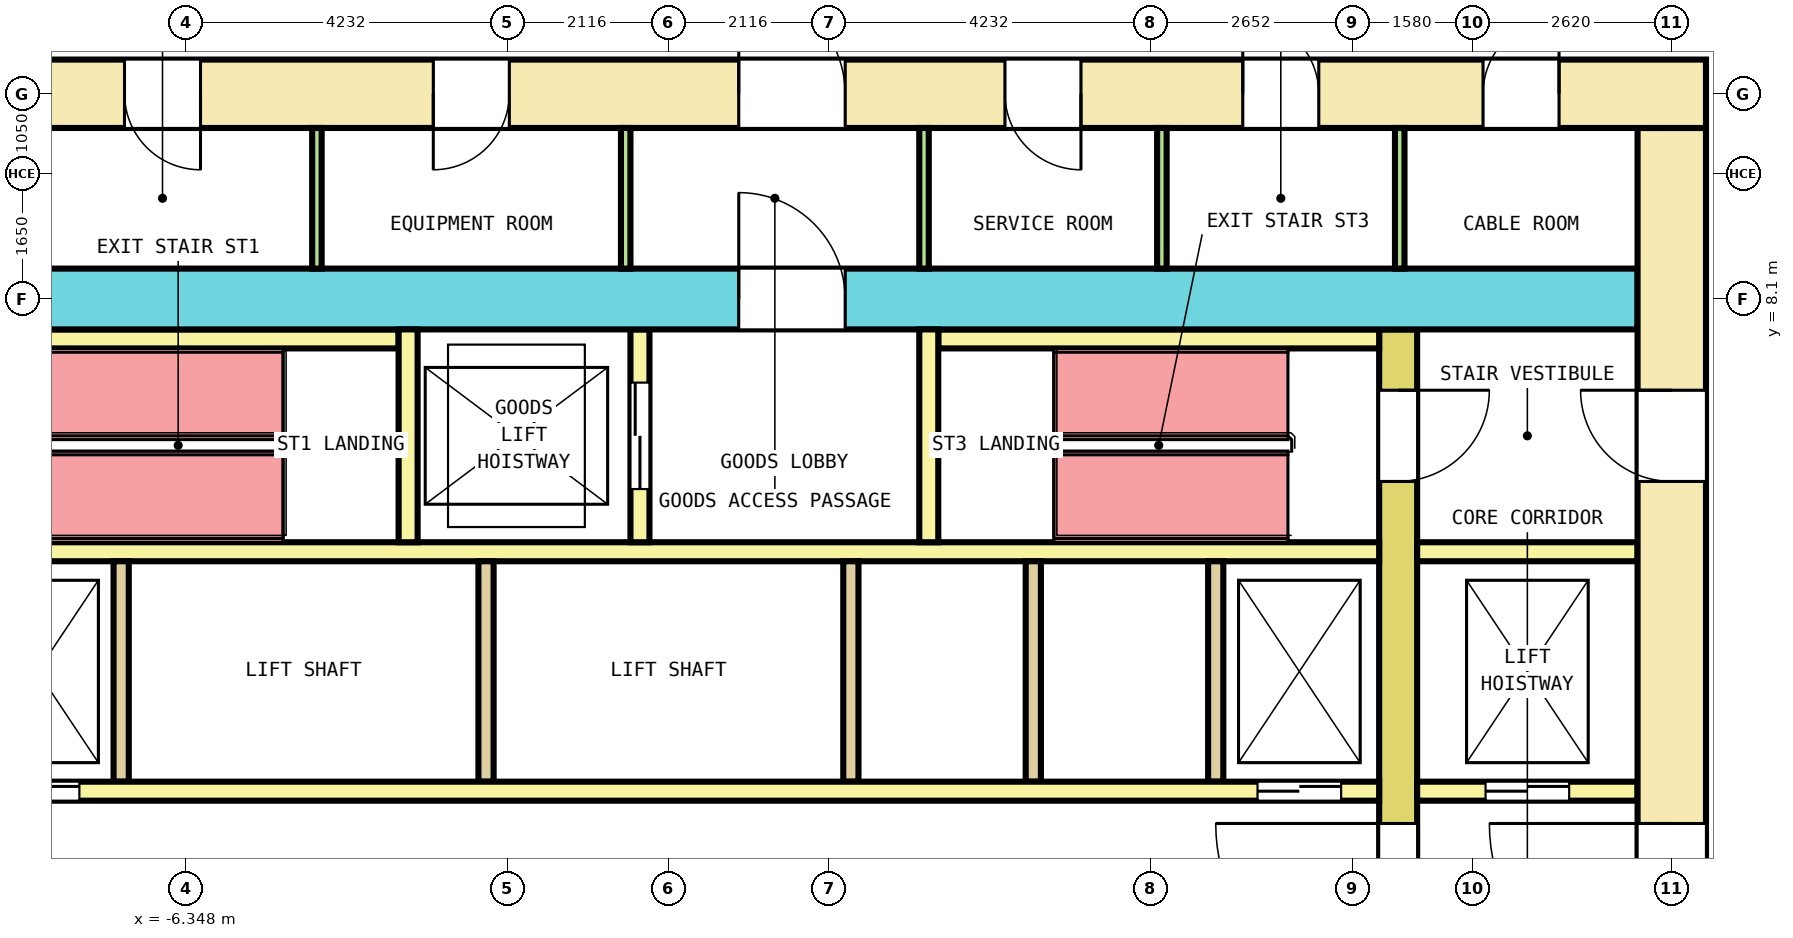
"""IFC4 building model, lengths in metres.
Left out: names, types, materials, properties, quantities, classifications, styles, units other than length and angle.
Written with IfcOpenShell. Run it as: python <this file> out.ifc"""

import sys

from ifc_helpers import new_model, si_unit, direction, frame, frame_2d, origin, place, context, subcontext, project, spatial, rectangle, extrude, element, fill, save


model = new_model("IFC4")
c1 = context("Model", 3, precision=1e-05, world=origin(), true_north=direction((0.0, 1.0)))
c2 = subcontext(c1, "Body", "Model", "MODEL_VIEW")
j1 = project(units=[si_unit("LENGTHUNIT", "METRE"), si_unit("PLANEANGLEUNIT", "RADIAN")], contexts=[c1])
p1 = place(None, origin())
s1 = spatial("IfcSite", under=j1, at=p1, CompositionType="ELEMENT")
p2 = place(p1, origin())
s2 = spatial("IfcBuilding", under=s1, at=p2, CompositionType="ELEMENT")
p3 = place(p2, frame((0.0, 0.0, 54.2)))
s3 = spatial("IfcBuildingStorey", under=s2, at=p3, CompositionType="ELEMENT", Elevation=54.2)
p4 = place(p3, frame((-13.65, 10.8, 0.0), z_axis=(0.0, 0.0, 1.0), x_axis=(1.0, 0.0, 0.0)))
e1 = element("IfcWall", 1, at=p4, inside=s3, PredefinedType="SHEAR", context=c2, shape_type="SweptSolid", body=[
    extrude(rectangle(XDim=27.3, YDim=0.9, at=frame_2d((13.65, 0.0))), origin(), (0.0, 0.0, 1.0), 4.1),
])
p5 = place(p4, frame((2.4, 0.0, 0.0)))
e2 = element("IfcOpeningElement", 2, at=p5, cuts=e1, PredefinedType="OPENING", context=c2, shape_type="SweptSolid", body=[
    extrude(rectangle(XDim=1.0, YDim=2.1, at=frame_2d((0.5, 1.05))), frame((0.0, 0.46, 0.0), z_axis=(0.0, -1.0, 0.0), x_axis=(1.0, 0.0, 0.0)), (0.0, 0.0, 1.0), 0.92),
])
p6 = place(p4, frame((6.494, 0.0, 0.0)))
e3 = element("IfcOpeningElement", 3, at=p6, cuts=e1, PredefinedType="OPENING", context=c2, shape_type="SweptSolid", body=[
    extrude(rectangle(XDim=1.0, YDim=2.1, at=frame_2d((0.5, 1.05))), frame((0.0, 0.46, 0.0), z_axis=(0.0, -1.0, 0.0), x_axis=(1.0, 0.0, 0.0)), (0.0, 0.0, 1.0), 0.92),
])
p7 = place(p4, frame((10.556, 0.0, 0.0)))
e4 = element("IfcOpeningElement", 4, at=p7, cuts=e1, PredefinedType="OPENING", context=c2, shape_type="SweptSolid", body=[
    extrude(rectangle(XDim=1.0, YDim=2.1, at=frame_2d((0.5, 1.05))), frame((0.0, 0.46, 0.0), z_axis=(0.0, -1.0, 0.0), x_axis=(1.0, 0.0, 0.0)), (0.0, 0.0, 1.0), 0.92),
])
p8 = place(p4, frame((18.077, 0.0, 0.0)))
e5 = element("IfcOpeningElement", 5, at=p8, cuts=e1, PredefinedType="OPENING", context=c2, shape_type="SweptSolid", body=[
    extrude(rectangle(XDim=1.0, YDim=2.1, at=frame_2d((0.5, 1.05))), frame((0.0, 0.46, 0.0), z_axis=(0.0, -1.0, 0.0), x_axis=(1.0, 0.0, 0.0)), (0.0, 0.0, 1.0), 0.92),
])
p9 = place(p4, frame((21.206, 0.0, 0.0)))
e6 = element("IfcOpeningElement", 6, at=p9, cuts=e1, PredefinedType="OPENING", context=c2, shape_type="SweptSolid", body=[
    extrude(rectangle(XDim=1.0, YDim=2.1, at=frame_2d((0.5, 1.05))), frame((0.0, 0.46, 0.0), z_axis=(0.0, -1.0, 0.0), x_axis=(1.0, 0.0, 0.0)), (0.0, 0.0, 1.0), 0.92),
])
p10 = place(p4, frame((24.367, 0.0, 0.0)))
e7 = element("IfcOpeningElement", 7, at=p10, cuts=e1, PredefinedType="OPENING", context=c2, shape_type="SweptSolid", body=[
    extrude(rectangle(XDim=1.0, YDim=2.1, at=frame_2d((0.5, 1.05))), frame((0.0, 0.46, 0.0), z_axis=(0.0, -1.0, 0.0), x_axis=(1.0, 0.0, 0.0)), (0.0, 0.0, 1.0), 0.92),
])
p11 = place(p4, frame((14.575, 0.0, 0.0)))
e8 = element("IfcOpeningElement", 8, at=p11, cuts=e1, PredefinedType="OPENING", context=c2, shape_type="SweptSolid", body=[
    extrude(rectangle(XDim=1.4, YDim=2.1, at=frame_2d((0.7, 1.05))), frame((0.0, 0.46, 0.0), z_axis=(0.0, -1.0, 0.0), x_axis=(1.0, 0.0, 0.0)), (0.0, 0.0, 1.0), 0.92),
])
p12 = place(p3, frame((13.2, -10.35, 0.0), z_axis=(0.0, 0.0, 1.0), x_axis=(0.0, 1.0, 0.0)))
e9 = element("IfcWall", 9, at=p12, inside=s3, PredefinedType="SHEAR", context=c2, shape_type="SweptSolid", body=[
    extrude(rectangle(XDim=20.7, YDim=0.9, at=frame_2d((10.35, 0.0))), origin(), (0.0, 0.0, 1.0), 4.1),
])
p13 = place(p12, frame((9.15, 0.0, 0.0)))
e10 = element("IfcOpeningElement", 10, at=p13, cuts=e9, PredefinedType="OPENING", context=c2, shape_type="SweptSolid", body=[
    extrude(rectangle(XDim=2.4, YDim=2.1, at=frame_2d((1.2, 1.05))), frame((0.0, 0.46, 0.0), z_axis=(0.0, -1.0, 0.0), x_axis=(1.0, 0.0, 0.0)), (0.0, 0.0, 1.0), 0.92),
])
p14 = place(p12, frame((16.05, 0.0, 0.0)))
e11 = element("IfcOpeningElement", 11, at=p14, cuts=e9, PredefinedType="OPENING", context=c2, shape_type="SweptSolid", body=[
    extrude(rectangle(XDim=1.2, YDim=2.1, at=frame_2d((0.6, 1.05))), frame((0.0, 0.46, 0.0), z_axis=(0.0, -1.0, 0.0), x_axis=(1.0, 0.0, 0.0)), (0.0, 0.0, 1.0), 0.92),
])
p15 = place(p12, frame((2.819, 0.0, 0.0)))
e12 = element("IfcOpeningElement", 12, at=p15, cuts=e9, PredefinedType="OPENING", context=c2, shape_type="SweptSolid", body=[
    extrude(rectangle(XDim=1.0, YDim=2.1, at=frame_2d((0.5, 1.05))), frame((0.0, 0.46, 0.0), z_axis=(0.0, -1.0, 0.0), x_axis=(1.0, 0.0, 0.0)), (0.0, 0.0, 1.0), 0.92),
])
p16 = place(p12, frame((4.281, 0.0, 0.0)))
e13 = element("IfcOpeningElement", 13, at=p16, cuts=e9, PredefinedType="OPENING", context=c2, shape_type="SweptSolid", body=[
    extrude(rectangle(XDim=1.0, YDim=2.1, at=frame_2d((0.5, 1.05))), frame((0.0, 0.46, 0.0), z_axis=(0.0, -1.0, 0.0), x_axis=(1.0, 0.0, 0.0)), (0.0, 0.0, 1.0), 0.92),
])
p17 = place(p3, frame((-12.75, 8.1, 0.0), z_axis=(0.0, 0.0, 1.0), x_axis=(1.0, 0.0, 0.0)))
e14 = element("IfcWall", 14, at=p17, inside=s3, PredefinedType="SHEAR", context=c2, shape_type="SweptSolid", body=[
    extrude(rectangle(XDim=25.5, YDim=0.8, at=frame_2d((12.75, 0.0))), origin(), (0.0, 0.0, 1.0), 4.1),
])
p18 = place(p17, frame((13.675, 0.0, 0.0)))
e15 = element("IfcOpeningElement", 15, at=p18, cuts=e14, PredefinedType="OPENING", context=c2, shape_type="SweptSolid", body=[
    extrude(rectangle(XDim=1.4, YDim=2.1, at=frame_2d((0.7, 1.05))), frame((0.0, 0.41, 0.0), z_axis=(0.0, -1.0, 0.0), x_axis=(1.0, 0.0, 0.0)), (0.0, 0.0, 1.0), 0.82),
])
p19 = place(p3, frame((9.6, -7.7, 0.0), z_axis=(0.0, 0.0, 1.0), x_axis=(0.0, 1.0, 0.0)))
e16 = element("IfcWall", 16, at=p19, inside=s3, PredefinedType="SHEAR", context=c2, shape_type="SweptSolid", body=[
    extrude(rectangle(XDim=15.4, YDim=0.5, at=frame_2d((7.7, 0.0))), origin(), (0.0, 0.0, 1.0), 4.1),
])
p20 = place(p19, frame((6.5, 0.0, 0.0)))
e17 = element("IfcOpeningElement", 17, at=p20, cuts=e16, PredefinedType="OPENING", context=c2, shape_type="SweptSolid", body=[
    extrude(rectangle(XDim=2.4, YDim=2.1, at=frame_2d((1.2, 1.05))), frame((0.0, 0.26, 0.0), z_axis=(0.0, -1.0, 0.0), x_axis=(1.0, 0.0, 0.0)), (0.0, 0.0, 1.0), 0.52),
])
p21 = place(p19, frame((13.4, 0.0, 0.0)))
e18 = element("IfcOpeningElement", 18, at=p21, cuts=e16, PredefinedType="OPENING", context=c2, shape_type="SweptSolid", body=[
    extrude(rectangle(XDim=1.2, YDim=2.1, at=frame_2d((0.6, 1.05))), frame((0.0, 0.26, 0.0), z_axis=(0.0, -1.0, 0.0), x_axis=(1.0, 0.0, 0.0)), (0.0, 0.0, 1.0), 0.52),
])
p22 = place(p19, frame((0.9, 0.0, 0.0)))
e19 = element("IfcOpeningElement", 19, at=p22, cuts=e16, PredefinedType="OPENING", context=c2, shape_type="SweptSolid", body=[
    extrude(rectangle(XDim=1.0, YDim=2.1, at=frame_2d((0.5, 1.05))), frame((0.0, 0.26, 0.0), z_axis=(0.0, -1.0, 0.0), x_axis=(1.0, 0.0, 0.0)), (0.0, 0.0, 1.0), 0.52),
])
p23 = place(p3, frame((-9.35, 1.625, 0.0), z_axis=(0.0, 0.0, 1.0), x_axis=(1.0, 0.0, 0.0)))
e20 = element("IfcWall", 20, at=p23, inside=s3, PredefinedType="SOLIDWALL", context=c2, shape_type="SweptSolid", body=[
    extrude(rectangle(XDim=18.7, YDim=0.25, at=frame_2d((9.35, 0.0))), origin(), (0.0, 0.0, 1.0), 4.1),
])
p24 = place(p23, frame((0.5, 0.0, 0.0)))
e21 = element("IfcOpeningElement", 21, at=p24, cuts=e20, PredefinedType="OPENING", context=c2, shape_type="SweptSolid", body=[
    extrude(rectangle(XDim=1.1, YDim=2.1, at=frame_2d((0.55, 1.05))), frame((0.0, 0.135, 0.0), z_axis=(0.0, -1.0, 0.0), x_axis=(1.0, 0.0, 0.0)), (0.0, 0.0, 1.0), 0.27),
])
p25 = place(p23, frame((17.1, 0.0, 0.0)))
e22 = element("IfcOpeningElement", 22, at=p25, cuts=e20, PredefinedType="OPENING", context=c2, shape_type="SweptSolid", body=[
    extrude(rectangle(XDim=1.1, YDim=2.1, at=frame_2d((0.55, 1.05))), frame((0.0, 0.135, 0.0), z_axis=(0.0, -1.0, 0.0), x_axis=(1.0, 0.0, 0.0)), (0.0, 0.0, 1.0), 0.27),
])
p26 = place(p3, frame((9.85, 1.625, 0.0), z_axis=(0.0, 0.0, 1.0), x_axis=(1.0, 0.0, 0.0)))
e23 = element("IfcWall", 23, at=p26, inside=s3, PredefinedType="SOLIDWALL", context=c2, shape_type="SweptSolid", body=[
    extrude(rectangle(XDim=2.9, YDim=0.25, at=frame_2d((1.45, 0.0))), origin(), (0.0, 0.0, 1.0), 4.1),
])
p27 = place(p26, frame((0.9, 0.0, 0.0)))
e24 = element("IfcOpeningElement", 24, at=p27, cuts=e23, PredefinedType="OPENING", context=c2, shape_type="SweptSolid", body=[
    extrude(rectangle(XDim=1.1, YDim=2.1, at=frame_2d((0.55, 1.05))), frame((0.0, 0.135, 0.0), z_axis=(0.0, -1.0, 0.0), x_axis=(1.0, 0.0, 0.0)), (0.0, 0.0, 1.0), 0.27),
])
p28 = place(p3, frame((-9.35, 4.775, 0.0), z_axis=(0.0, 0.0, 1.0), x_axis=(1.0, 0.0, 0.0)))
e25 = element("IfcWall", 25, at=p28, inside=s3, PredefinedType="SOLIDWALL", context=c2, shape_type="SweptSolid", body=[
    extrude(rectangle(XDim=18.7, YDim=0.25, at=frame_2d((9.35, 0.0))), origin(), (0.0, 0.0, 1.0), 4.1),
])
p29 = place(p3, frame((9.85, 4.775, 0.0), z_axis=(0.0, 0.0, 1.0), x_axis=(1.0, 0.0, 0.0)))
e26 = element("IfcWall", 26, at=p29, inside=s3, PredefinedType="SOLIDWALL", context=c2, shape_type="SweptSolid", body=[
    extrude(rectangle(XDim=2.9, YDim=0.25, at=frame_2d((1.45, 0.0))), origin(), (0.0, 0.0, 1.0), 4.1),
])
for number, where, z_axis, x_axis in (
    (27, (-7.2, 1.75, 0.0), (0.0, 0.0, 1.0), (0.0, 1.0, 0.0)),
    (28, (-2.4, 1.75, 0.0), (0.0, 0.0, 1.0), (0.0, 1.0, 0.0)),
    (29, (2.4, 1.75, 0.0), (0.0, 0.0, 1.0), (0.0, 1.0, 0.0)),
    (30, (4.8, 1.75, 0.0), (0.0, 0.0, 1.0), (0.0, 1.0, 0.0)),
    (31, (7.2, 1.75, 0.0), (0.0, 0.0, 1.0), (0.0, 1.0, 0.0)),
):
    element("IfcWall", number, at=place(p3, frame(where, z_axis=z_axis, x_axis=x_axis)), inside=s3, PredefinedType="SOLIDWALL", context=c2, shape_type="SweptSolid", body=[
        extrude(rectangle(XDim=2.9, YDim=0.2, at=frame_2d((1.45, 0.0))), origin(), (0.0, 0.0, 1.0), 4.1),
    ])
for number, where, z_axis, x_axis in (
    (32, (-9.35, 7.575, 0.0), (0.0, 0.0, 1.0), (1.0, 0.0, 0.0)),
    (33, (3.55, 7.575, 0.0), (0.0, 0.0, 1.0), (1.0, 0.0, 0.0)),
):
    element("IfcWall", number, at=place(p3, frame(where, z_axis=z_axis, x_axis=x_axis)), inside=s3, PredefinedType="SOLIDWALL", context=c2, shape_type="SweptSolid", body=[
        extrude(rectangle(XDim=5.8, YDim=0.25, at=frame_2d((2.9, 0.0))), origin(), (0.0, 0.0, 1.0), 4.1),
    ])
p30 = place(p3, frame((-3.425, 4.9, 0.0), z_axis=(0.0, 0.0, 1.0), x_axis=(0.0, 1.0, 0.0)))
e34 = element("IfcWall", 34, at=p30, inside=s3, PredefinedType="SOLIDWALL", context=c2, shape_type="SweptSolid", body=[
    extrude(rectangle(XDim=2.8, YDim=0.25, at=frame_2d((1.4, 0.0))), origin(), (0.0, 0.0, 1.0), 4.1),
])
p31 = place(p3, frame((-0.375, 4.9, 0.0), z_axis=(0.0, 0.0, 1.0), x_axis=(0.0, 1.0, 0.0)))
e35 = element("IfcWall", 35, at=p31, inside=s3, PredefinedType="SOLIDWALL", context=c2, shape_type="SweptSolid", body=[
    extrude(rectangle(XDim=2.8, YDim=0.25, at=frame_2d((1.4, 0.0))), origin(), (0.0, 0.0, 1.0), 4.1),
])
p32 = place(p31, frame((0.7, 0.0, 0.0)))
e36 = element("IfcOpeningElement", 36, at=p32, cuts=e35, PredefinedType="OPENING", context=c2, shape_type="SweptSolid", body=[
    extrude(rectangle(XDim=1.4, YDim=2.1, at=frame_2d((0.7, 1.05))), frame((0.0, 0.135, 0.0), z_axis=(0.0, -1.0, 0.0), x_axis=(1.0, 0.0, 0.0)), (0.0, 0.0, 1.0), 0.27),
])
p33 = place(p3, frame((3.425, 4.9, 0.0), z_axis=(0.0, 0.0, 1.0), x_axis=(0.0, 1.0, 0.0)))
e37 = element("IfcWall", 37, at=p33, inside=s3, PredefinedType="SOLIDWALL", context=c2, shape_type="SweptSolid", body=[
    extrude(rectangle(XDim=2.8, YDim=0.25, at=frame_2d((1.4, 0.0))), origin(), (0.0, 0.0, 1.0), 4.1),
])
for number, where, z_axis, x_axis in (
    (38, (-4.625, 8.5, 0.0), (0.0, 0.0, 1.0), (0.0, 1.0, 0.0)),
    (39, (-0.562, 8.5, 0.0), (0.0, 0.0, 1.0), (0.0, 1.0, 0.0)),
    (40, (3.363, 8.5, 0.0), (0.0, 0.0, 1.0), (0.0, 1.0, 0.0)),
    (41, (6.492, 8.5, 0.0), (0.0, 0.0, 1.0), (0.0, 1.0, 0.0)),
    (42, (9.621, 8.5, 0.0), (0.0, 0.0, 1.0), (0.0, 1.0, 0.0)),
):
    element("IfcWall", number, at=place(p3, frame(where, z_axis=z_axis, x_axis=x_axis)), inside=s3, PredefinedType="PARTITIONING", context=c2, shape_type="SweptSolid", body=[
        extrude(rectangle(XDim=1.85, YDim=0.125, at=frame_2d((0.925, 0.0))), origin(), (0.0, 0.0, 1.0), 4.1),
    ])
p34 = place(p24, origin())
e43 = element("IfcDoor", 43, at=p34, inside=s3, OperationType="DOUBLE_DOOR_SLIDING", PredefinedType="DOOR", context=c2, shape_type="SweptSolid", body=[
    extrude(rectangle(XDim=1.1, YDim=2.1, at=frame_2d((0.55, 1.05))), frame((0.0, 0.075, 0.0), z_axis=(0.0, -1.0, 0.0), x_axis=(1.0, 0.0, 0.0)), (0.0, 0.0, 1.0), 0.15),
])
fill(e21, e43)
p35 = place(p25, origin())
e44 = element("IfcDoor", 44, at=p35, inside=s3, OperationType="DOUBLE_DOOR_SLIDING", PredefinedType="DOOR", context=c2, shape_type="SweptSolid", body=[
    extrude(rectangle(XDim=1.1, YDim=2.1, at=frame_2d((0.55, 1.05))), frame((0.0, 0.075, 0.0), z_axis=(0.0, -1.0, 0.0), x_axis=(1.0, 0.0, 0.0)), (0.0, 0.0, 1.0), 0.15),
])
fill(e22, e44)
p36 = place(p27, origin())
e45 = element("IfcDoor", 45, at=p36, inside=s3, OperationType="DOUBLE_DOOR_SLIDING", PredefinedType="DOOR", context=c2, shape_type="SweptSolid", body=[
    extrude(rectangle(XDim=1.1, YDim=2.1, at=frame_2d((0.55, 1.05))), frame((0.0, 0.075, 0.0), z_axis=(0.0, -1.0, 0.0), x_axis=(1.0, 0.0, 0.0)), (0.0, 0.0, 1.0), 0.15),
])
fill(e24, e45)
p37 = place(p32, origin())
e46 = element("IfcDoor", 46, at=p37, inside=s3, OperationType="DOUBLE_DOOR_SLIDING", PredefinedType="DOOR", context=c2, shape_type="SweptSolid", body=[
    extrude(rectangle(XDim=1.4, YDim=2.1, at=frame_2d((0.7, 1.05))), frame((0.0, 0.075, 0.0), z_axis=(0.0, -1.0, 0.0), x_axis=(1.0, 0.0, 0.0)), (0.0, 0.0, 1.0), 0.15),
])
fill(e36, e46)
p38 = place(p20, origin())
e47 = element("IfcDoor", 47, at=p38, inside=s3, OperationType="DOUBLE_DOOR_SINGLE_SWING", PredefinedType="DOOR", context=c2, shape_type="SweptSolid", body=[
    extrude(rectangle(XDim=2.4, YDim=2.1, at=frame_2d((1.2, 1.05))), frame((0.0, 0.2, 0.0), z_axis=(0.0, -1.0, 0.0), x_axis=(1.0, 0.0, 0.0)), (0.0, 0.0, 1.0), 0.4),
])
fill(e17, e47)
p39 = place(p13, origin())
e48 = element("IfcDoor", 48, at=p39, inside=s3, OperationType="DOUBLE_DOOR_SINGLE_SWING", PredefinedType="DOOR", context=c2, shape_type="SweptSolid", body=[
    extrude(rectangle(XDim=2.4, YDim=2.1, at=frame_2d((1.2, 1.05))), frame((0.0, 0.3, 0.0), z_axis=(0.0, -1.0, 0.0), x_axis=(1.0, 0.0, 0.0)), (0.0, 0.0, 1.0), 0.6),
])
fill(e10, e48)
p40 = place(p21, origin())
e49 = element("IfcDoor", 49, at=p40, inside=s3, OperationType="SINGLE_SWING_LEFT", PredefinedType="DOOR", context=c2, shape_type="SweptSolid", body=[
    extrude(rectangle(XDim=1.2, YDim=2.1, at=frame_2d((0.6, 1.05))), frame((0.0, 0.2, 0.0), z_axis=(0.0, -1.0, 0.0), x_axis=(1.0, 0.0, 0.0)), (0.0, 0.0, 1.0), 0.4),
])
fill(e18, e49)
p41 = place(p14, origin())
e50 = element("IfcDoor", 50, at=p41, inside=s3, OperationType="SINGLE_SWING_RIGHT", PredefinedType="DOOR", context=c2, shape_type="SweptSolid", body=[
    extrude(rectangle(XDim=1.2, YDim=2.1, at=frame_2d((0.6, 1.05))), frame((0.0, 0.3, 0.0), z_axis=(0.0, -1.0, 0.0), x_axis=(1.0, 0.0, 0.0)), (0.0, 0.0, 1.0), 0.6),
])
fill(e11, e50)
p42 = place(p18, origin())
e51 = element("IfcDoor", 51, at=p42, inside=s3, OperationType="DOUBLE_DOOR_SINGLE_SWING", PredefinedType="DOOR", context=c2, shape_type="SweptSolid", body=[
    extrude(rectangle(XDim=1.4, YDim=2.1, at=frame_2d((0.7, 1.05))), frame((0.0, 0.3, 0.0), z_axis=(0.0, -1.0, 0.0), x_axis=(1.0, 0.0, 0.0)), (0.0, 0.0, 1.0), 0.6),
])
fill(e15, e51)
p43 = place(p6, origin())
e52 = element("IfcDoor", 52, at=p43, inside=s3, OperationType="SINGLE_SWING_LEFT", PredefinedType="DOOR", context=c2, shape_type="SweptSolid", body=[
    extrude(rectangle(XDim=1.0, YDim=2.1, at=frame_2d((0.5, 1.05))), frame((0.0, 0.3, 0.0), z_axis=(0.0, -1.0, 0.0), x_axis=(1.0, 0.0, 0.0)), (0.0, 0.0, 1.0), 0.6),
])
fill(e3, e52)
p44 = place(p7, origin())
e53 = element("IfcDoor", 53, at=p44, inside=s3, OperationType="SINGLE_SWING_RIGHT", PredefinedType="DOOR", context=c2, shape_type="SweptSolid", body=[
    extrude(rectangle(XDim=1.0, YDim=2.1, at=frame_2d((0.5, 1.05))), frame((0.0, 0.3, 0.0), z_axis=(0.0, -1.0, 0.0), x_axis=(1.0, 0.0, 0.0)), (0.0, 0.0, 1.0), 0.6),
])
fill(e4, e53)
p45 = place(p8, origin())
e54 = element("IfcDoor", 54, at=p45, inside=s3, OperationType="SINGLE_SWING_LEFT", PredefinedType="DOOR", context=c2, shape_type="SweptSolid", body=[
    extrude(rectangle(XDim=1.0, YDim=2.1, at=frame_2d((0.5, 1.05))), frame((0.0, 0.3, 0.0), z_axis=(0.0, -1.0, 0.0), x_axis=(1.0, 0.0, 0.0)), (0.0, 0.0, 1.0), 0.6),
])
fill(e5, e54)
p46 = place(p9, origin())
e55 = element("IfcDoor", 55, at=p46, inside=s3, OperationType="SINGLE_SWING_RIGHT", PredefinedType="DOOR", context=c2, shape_type="SweptSolid", body=[
    extrude(rectangle(XDim=1.0, YDim=2.1, at=frame_2d((0.5, 1.05))), frame((0.0, 0.3, 0.0), z_axis=(0.0, -1.0, 0.0), x_axis=(1.0, 0.0, 0.0)), (0.0, 0.0, 1.0), 0.6),
])
fill(e6, e55)
p47 = place(p10, origin())
e56 = element("IfcDoor", 56, at=p47, inside=s3, OperationType="SINGLE_SWING_LEFT", PredefinedType="DOOR", context=c2, shape_type="SweptSolid", body=[
    extrude(rectangle(XDim=1.0, YDim=2.1, at=frame_2d((0.5, 1.05))), frame((0.0, 0.3, 0.0), z_axis=(0.0, -1.0, 0.0), x_axis=(1.0, 0.0, 0.0)), (0.0, 0.0, 1.0), 0.6),
])
fill(e7, e56)
p48 = place(p11, origin())
e57 = element("IfcDoor", 57, at=p48, inside=s3, OperationType="DOUBLE_DOOR_SINGLE_SWING", PredefinedType="DOOR", context=c2, shape_type="SweptSolid", body=[
    extrude(rectangle(XDim=1.4, YDim=2.1, at=frame_2d((0.7, 1.05))), frame((0.0, 0.3, 0.0), z_axis=(0.0, -1.0, 0.0), x_axis=(1.0, 0.0, 0.0)), (0.0, 0.0, 1.0), 0.6),
])
fill(e8, e57)
save(model, sys.argv[1])
